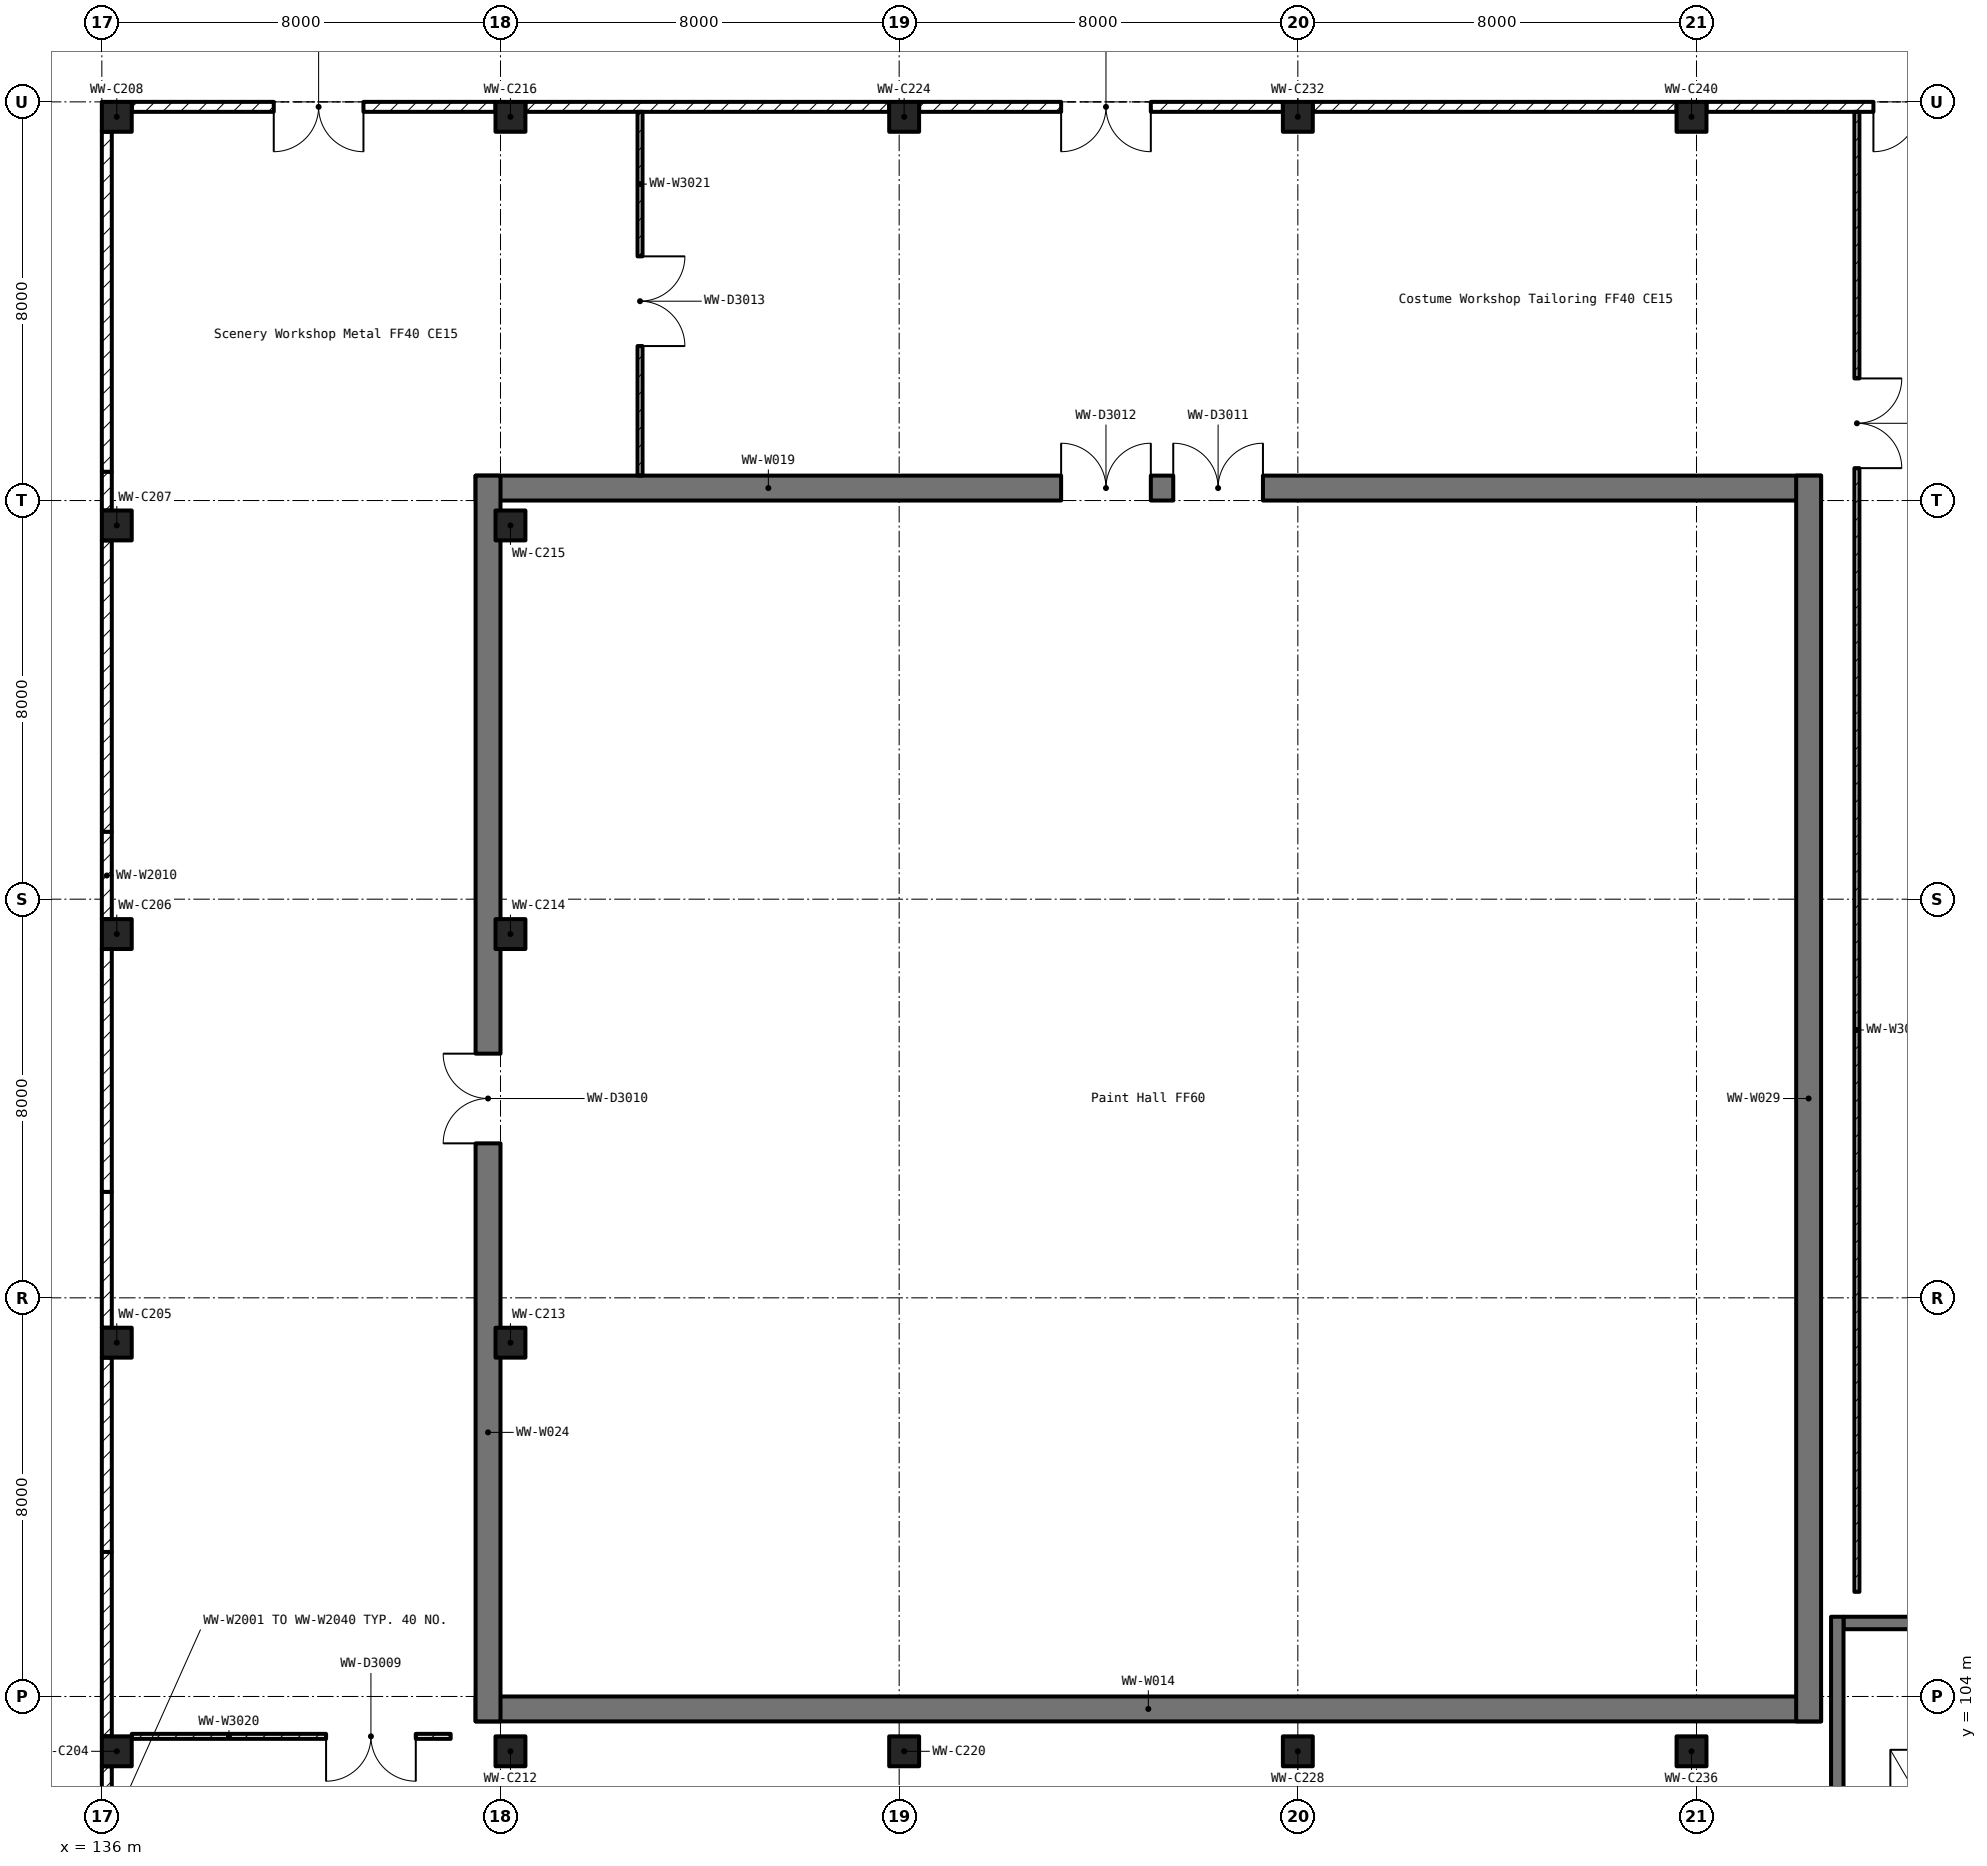
"""IFC4 building model, lengths in metres.
Left out: names, types, materials, properties, quantities, classifications, styles, units other than length and angle.
Written with IfcOpenShell. Run it as: python <this file> out.ifc"""

import sys

from ifc_helpers import new_model, si_unit, direction, frame, frame_2d, origin, origin_2d, place, context, subcontext, project, spatial, rectangle, extrude, element, fill, save


model = new_model("IFC4")
c1 = context("Model", 3, precision=1e-05, world=origin(), true_north=direction((0.0, 1.0)))
c2 = subcontext(c1, "Body", "Model", "MODEL_VIEW")
j1 = project(units=[si_unit("LENGTHUNIT", "METRE"), si_unit("PLANEANGLEUNIT", "RADIAN")], contexts=[c1])
p1 = place(None, origin())
s1 = spatial("IfcSite", under=j1, at=p1, CompositionType="ELEMENT")
p2 = place(p1, origin())
s2 = spatial("IfcBuilding", under=s1, at=p2, CompositionType="ELEMENT")
p3 = place(p2, origin())
s3 = spatial("IfcBuildingStorey", under=s2, at=p3, CompositionType="ELEMENT", Elevation=0.0)
for number, where, z_axis, x_axis in (
    (1, (136.3, 102.9, 0.0), (0.0, 0.0, 1.0), (1.0, 0.0, 0.0)),
    (2, (136.3, 111.1, 0.0), (0.0, 0.0, 1.0), (1.0, 0.0, 0.0)),
    (3, (136.3, 119.3, 0.0), (0.0, 0.0, 1.0), (1.0, 0.0, 0.0)),
    (4, (136.3, 127.5, 0.0), (0.0, 0.0, 1.0), (1.0, 0.0, 0.0)),
    (5, (136.3, 135.7, 0.0), (0.0, 0.0, 1.0), (1.0, 0.0, 0.0)),
    (6, (144.2, 102.9, 0.0), (0.0, 0.0, 1.0), (1.0, 0.0, 0.0)),
    (7, (144.2, 111.1, 0.0), (0.0, 0.0, 1.0), (1.0, 0.0, 0.0)),
    (8, (144.2, 119.3, 0.0), (0.0, 0.0, 1.0), (1.0, 0.0, 0.0)),
    (9, (144.2, 127.5, 0.0), (0.0, 0.0, 1.0), (1.0, 0.0, 0.0)),
    (10, (144.2, 135.7, 0.0), (0.0, 0.0, 1.0), (1.0, 0.0, 0.0)),
    (11, (152.1, 102.9, 0.0), (0.0, 0.0, 1.0), (1.0, 0.0, 0.0)),
    (12, (152.1, 135.7, 0.0), (0.0, 0.0, 1.0), (1.0, 0.0, 0.0)),
    (13, (160.0, 102.9, 0.0), (0.0, 0.0, 1.0), (1.0, 0.0, 0.0)),
    (14, (160.0, 135.7, 0.0), (0.0, 0.0, 1.0), (1.0, 0.0, 0.0)),
    (15, (167.9, 102.9, 0.0), (0.0, 0.0, 1.0), (1.0, 0.0, 0.0)),
    (16, (167.9, 135.7, 0.0), (0.0, 0.0, 1.0), (1.0, 0.0, 0.0)),
):
    element("IfcColumn", number, at=place(p3, frame(where, z_axis=z_axis, x_axis=x_axis)), inside=s3, PredefinedType="COLUMN", context=c2, shape_type="SweptSolid", body=[
        extrude(rectangle(XDim=0.6, YDim=0.6, at=origin_2d()), origin(), (0.0, 0.0, 1.0), 6.0),
    ])
p4 = place(p3, frame((143.5, 103.75, 0.0), z_axis=(0.0, 0.0, 1.0), x_axis=(1.0, 0.0, 0.0)))
e17 = element("IfcWall", 17, at=p4, inside=s3, PredefinedType="SHEAR", context=c2, shape_type="SweptSolid", body=[
    extrude(rectangle(XDim=27.0, YDim=0.5, at=frame_2d((13.5, 0.0))), origin(), (0.0, 0.0, 1.0), 6.0),
])
p5 = place(p3, frame((143.5, 128.25, 0.0), z_axis=(0.0, 0.0, 1.0), x_axis=(1.0, 0.0, 0.0)))
e18 = element("IfcWall", 18, at=p5, inside=s3, PredefinedType="SHEAR", context=c2, shape_type="SweptSolid", body=[
    extrude(rectangle(XDim=27.0, YDim=0.5, at=frame_2d((13.5, 0.0))), origin(), (0.0, 0.0, 1.0), 6.0),
])
p6 = place(p5, frame((14.0, 0.0, 0.0)))
e19 = element("IfcOpeningElement", 19, at=p6, cuts=e18, PredefinedType="OPENING", context=c2, shape_type="SweptSolid", body=[
    extrude(rectangle(XDim=1.8, YDim=2.1, at=frame_2d((0.9, 1.05))), frame((0.0, 0.262, 0.0), z_axis=(0.0, -1.0, 0.0), x_axis=(1.0, 0.0, 0.0)), (0.0, 0.0, 1.0), 0.524),
])
p7 = place(p5, frame((11.75, 0.0, 0.0)))
e20 = element("IfcOpeningElement", 20, at=p7, cuts=e18, PredefinedType="OPENING", context=c2, shape_type="SweptSolid", body=[
    extrude(rectangle(XDim=1.8, YDim=2.1, at=frame_2d((0.9, 1.05))), frame((0.0, 0.262, 0.0), z_axis=(0.0, -1.0, 0.0), x_axis=(1.0, 0.0, 0.0)), (0.0, 0.0, 1.0), 0.524),
])
p8 = place(p3, frame((143.75, 103.5, 0.0), z_axis=(0.0, 0.0, 1.0), x_axis=(0.0, 1.0, 0.0)))
e21 = element("IfcWall", 21, at=p8, inside=s3, PredefinedType="SHEAR", context=c2, shape_type="SweptSolid", body=[
    extrude(rectangle(XDim=25.0, YDim=0.5, at=frame_2d((12.5, 0.0))), origin(), (0.0, 0.0, 1.0), 6.0),
])
p9 = place(p8, frame((11.6, 0.0, 0.0)))
e22 = element("IfcOpeningElement", 22, at=p9, cuts=e21, PredefinedType="OPENING", context=c2, shape_type="SweptSolid", body=[
    extrude(rectangle(XDim=1.8, YDim=2.1, at=frame_2d((0.9, 1.05))), frame((0.0, 0.262, 0.0), z_axis=(0.0, -1.0, 0.0), x_axis=(1.0, 0.0, 0.0)), (0.0, 0.0, 1.0), 0.524),
])
p10 = place(p3, frame((170.25, 103.5, 0.0), z_axis=(0.0, 0.0, 1.0), x_axis=(0.0, 1.0, 0.0)))
e23 = element("IfcWall", 23, at=p10, inside=s3, PredefinedType="SHEAR", context=c2, shape_type="SweptSolid", body=[
    extrude(rectangle(XDim=25.0, YDim=0.5, at=frame_2d((12.5, 0.0))), origin(), (0.0, 0.0, 1.0), 6.0),
])
p11 = place(p3, frame((175.5, 135.9, 0.0), z_axis=(0.0, 0.0, 1.0), x_axis=(-1.0, 0.0, 0.0)))
e24 = element("IfcWall", 24, at=p11, inside=s3, PredefinedType="SOLIDWALL", context=c2, shape_type="SweptSolid", body=[
    extrude(rectangle(XDim=7.3, YDim=0.2, at=frame_2d((3.65, 0.0))), origin(), (0.0, 0.0, 1.0), 5.05),
])
p12 = place(p11, frame((2.15, 0.0, 0.0)))
e25 = element("IfcOpeningElement", 25, at=p12, cuts=e24, PredefinedType="OPENING", context=c2, shape_type="SweptSolid", body=[
    extrude(rectangle(XDim=1.8, YDim=2.4, at=frame_2d((0.9, 1.2))), frame((0.0, 0.112, 0.0), z_axis=(0.0, -1.0, 0.0), x_axis=(1.0, 0.0, 0.0)), (0.0, 0.0, 1.0), 0.224),
])
p13 = place(p3, frame((167.6, 135.9, 0.0), z_axis=(0.0, 0.0, 1.0), x_axis=(-1.0, 0.0, 0.0)))
e26 = element("IfcWall", 26, at=p13, inside=s3, PredefinedType="SOLIDWALL", context=c2, shape_type="SweptSolid", body=[
    extrude(rectangle(XDim=7.3, YDim=0.2, at=frame_2d((3.65, 0.0))), origin(), (0.0, 0.0, 1.0), 5.05),
])
p14 = place(p3, frame((159.7, 135.9, 0.0), z_axis=(0.0, 0.0, 1.0), x_axis=(-1.0, 0.0, 0.0)))
e27 = element("IfcWall", 27, at=p14, inside=s3, PredefinedType="SOLIDWALL", context=c2, shape_type="SweptSolid", body=[
    extrude(rectangle(XDim=7.3, YDim=0.2, at=frame_2d((3.65, 0.0))), origin(), (0.0, 0.0, 1.0), 5.05),
])
p15 = place(p14, frame((2.65, 0.0, 0.0)))
e28 = element("IfcOpeningElement", 28, at=p15, cuts=e27, PredefinedType="OPENING", context=c2, shape_type="SweptSolid", body=[
    extrude(rectangle(XDim=1.8, YDim=2.4, at=frame_2d((0.9, 1.2))), frame((0.0, 0.112, 0.0), z_axis=(0.0, -1.0, 0.0), x_axis=(1.0, 0.0, 0.0)), (0.0, 0.0, 1.0), 0.224),
])
p16 = place(p3, frame((151.8, 135.9, 0.0), z_axis=(0.0, 0.0, 1.0), x_axis=(-1.0, 0.0, 0.0)))
e29 = element("IfcWall", 29, at=p16, inside=s3, PredefinedType="SOLIDWALL", context=c2, shape_type="SweptSolid", body=[
    extrude(rectangle(XDim=7.3, YDim=0.2, at=frame_2d((3.65, 0.0))), origin(), (0.0, 0.0, 1.0), 5.05),
])
p17 = place(p3, frame((143.9, 135.9, 0.0), z_axis=(0.0, 0.0, 1.0), x_axis=(-1.0, 0.0, 0.0)))
e30 = element("IfcWall", 30, at=p17, inside=s3, PredefinedType="SOLIDWALL", context=c2, shape_type="SweptSolid", body=[
    extrude(rectangle(XDim=7.3, YDim=0.2, at=frame_2d((3.65, 0.0))), origin(), (0.0, 0.0, 1.0), 5.05),
])
p18 = place(p17, frame((2.65, 0.0, 0.0)))
e31 = element("IfcOpeningElement", 31, at=p18, cuts=e30, PredefinedType="OPENING", context=c2, shape_type="SweptSolid", body=[
    extrude(rectangle(XDim=1.8, YDim=2.4, at=frame_2d((0.9, 1.2))), frame((0.0, 0.112, 0.0), z_axis=(0.0, -1.0, 0.0), x_axis=(1.0, 0.0, 0.0)), (0.0, 0.0, 1.0), 0.224),
])
p19 = place(p3, frame((136.1, 135.4, 0.0), z_axis=(0.0, 0.0, 1.0), x_axis=(0.0, -1.0, 0.0)))
e32 = element("IfcWall", 32, at=p19, inside=s3, PredefinedType="SOLIDWALL", context=c2, shape_type="SweptSolid", body=[
    extrude(rectangle(XDim=6.825, YDim=0.2, at=frame_2d((3.413, 0.0))), origin(), (0.0, 0.0, 1.0), 5.05),
])
p20 = place(p3, frame((136.1, 128.575, 0.0), z_axis=(0.0, 0.0, 1.0), x_axis=(0.0, -1.0, 0.0)))
e33 = element("IfcWall", 33, at=p20, inside=s3, PredefinedType="SOLIDWALL", context=c2, shape_type="SweptSolid", body=[
    extrude(rectangle(XDim=0.775, YDim=0.2, at=frame_2d((0.387, 0.0))), origin(), (0.0, 0.0, 1.0), 5.05),
])
p21 = place(p3, frame((136.1, 127.2, 0.0), z_axis=(0.0, 0.0, 1.0), x_axis=(0.0, -1.0, 0.0)))
e34 = element("IfcWall", 34, at=p21, inside=s3, PredefinedType="SOLIDWALL", context=c2, shape_type="SweptSolid", body=[
    extrude(rectangle(XDim=5.85, YDim=0.2, at=frame_2d((2.925, 0.0))), origin(), (0.0, 0.0, 1.0), 5.05),
])
p22 = place(p3, frame((136.1, 121.35, 0.0), z_axis=(0.0, 0.0, 1.0), x_axis=(0.0, -1.0, 0.0)))
e35 = element("IfcWall", 35, at=p22, inside=s3, PredefinedType="SOLIDWALL", context=c2, shape_type="SweptSolid", body=[
    extrude(rectangle(XDim=1.75, YDim=0.2, at=frame_2d((0.875, 0.0))), origin(), (0.0, 0.0, 1.0), 5.05),
])
p23 = place(p3, frame((136.1, 119.0, 0.0), z_axis=(0.0, 0.0, 1.0), x_axis=(0.0, -1.0, 0.0)))
e36 = element("IfcWall", 36, at=p23, inside=s3, PredefinedType="SOLIDWALL", context=c2, shape_type="SweptSolid", body=[
    extrude(rectangle(XDim=4.875, YDim=0.2, at=frame_2d((2.438, 0.0))), origin(), (0.0, 0.0, 1.0), 5.05),
])
p24 = place(p3, frame((136.1, 114.125, 0.0), z_axis=(0.0, 0.0, 1.0), x_axis=(0.0, -1.0, 0.0)))
e37 = element("IfcWall", 37, at=p24, inside=s3, PredefinedType="SOLIDWALL", context=c2, shape_type="SweptSolid", body=[
    extrude(rectangle(XDim=2.725, YDim=0.2, at=frame_2d((1.363, 0.0))), origin(), (0.0, 0.0, 1.0), 5.05),
])
p25 = place(p3, frame((136.1, 110.8, 0.0), z_axis=(0.0, 0.0, 1.0), x_axis=(0.0, -1.0, 0.0)))
e38 = element("IfcWall", 38, at=p25, inside=s3, PredefinedType="SOLIDWALL", context=c2, shape_type="SweptSolid", body=[
    extrude(rectangle(XDim=3.9, YDim=0.2, at=frame_2d((1.95, 0.0))), origin(), (0.0, 0.0, 1.0), 5.05),
])
p26 = place(p3, frame((136.1, 106.9, 0.0), z_axis=(0.0, 0.0, 1.0), x_axis=(0.0, -1.0, 0.0)))
e39 = element("IfcWall", 39, at=p26, inside=s3, PredefinedType="SOLIDWALL", context=c2, shape_type="SweptSolid", body=[
    extrude(rectangle(XDim=3.7, YDim=0.2, at=frame_2d((1.85, 0.0))), origin(), (0.0, 0.0, 1.0), 5.05),
])
p27 = place(p3, frame((136.1, 102.6, 0.0), z_axis=(0.0, 0.0, 1.0), x_axis=(0.0, -1.0, 0.0)))
e40 = element("IfcWall", 40, at=p27, inside=s3, PredefinedType="SOLIDWALL", context=c2, shape_type="SweptSolid", body=[
    extrude(rectangle(XDim=2.925, YDim=0.2, at=frame_2d((1.462, 0.0))), origin(), (0.0, 0.0, 1.0), 5.05),
])
p28 = place(p3, frame((174.05, 105.475, 0.0), z_axis=(0.0, 0.0, 1.0), x_axis=(-1.0, 0.0, 0.0)))
e41 = element("IfcWall", 41, at=p28, inside=s3, PredefinedType="SOLIDWALL", context=c2, shape_type="SweptSolid", body=[
    extrude(rectangle(XDim=3.1, YDim=0.25, at=frame_2d((1.55, 0.0))), origin(), (0.0, 0.0, 1.0), 6.0),
])
p29 = place(p3, frame((170.825, 105.6, 0.0), z_axis=(0.0, 0.0, 1.0), x_axis=(0.0, -1.0, 0.0)))
e42 = element("IfcWall", 42, at=p29, inside=s3, PredefinedType="SOLIDWALL", context=c2, shape_type="SweptSolid", body=[
    extrude(rectangle(XDim=6.6, YDim=0.25, at=frame_2d((3.3, 0.0))), origin(), (0.0, 0.0, 1.0), 6.0),
])
p30 = place(p3, frame((171.219, 135.8, 0.0), z_axis=(0.0, 0.0, 1.0), x_axis=(0.0, -1.0, 0.0)))
e43 = element("IfcWall", 43, at=p30, inside=s3, PredefinedType="PARTITIONING", context=c2, shape_type="SweptSolid", body=[
    extrude(rectangle(XDim=29.7, YDim=0.1, at=frame_2d((14.85, 0.0))), origin(), (0.0, 0.0, 1.0), 4.95),
])
p31 = place(p30, frame((5.35, 0.0, 0.0)))
e44 = element("IfcOpeningElement", 44, at=p31, cuts=e43, PredefinedType="OPENING", context=c2, shape_type="SweptSolid", body=[
    extrude(rectangle(XDim=1.8, YDim=2.1, at=frame_2d((0.9, 1.05))), frame((0.0, 0.062, 0.0), z_axis=(0.0, -1.0, 0.0), x_axis=(1.0, 0.0, 0.0)), (0.0, 0.0, 1.0), 0.124),
])
p32 = place(p3, frame((143.0, 103.2, 0.0), z_axis=(0.0, 0.0, 1.0), x_axis=(-1.0, 0.0, 0.0)))
e45 = element("IfcWall", 45, at=p32, inside=s3, PredefinedType="PARTITIONING", context=c2, shape_type="SweptSolid", body=[
    extrude(rectangle(XDim=6.399, YDim=0.1, at=frame_2d((3.199, 0.0))), origin(), (0.0, 0.0, 1.0), 4.95),
])
p33 = place(p32, frame((0.7, 0.0, 0.0)))
e46 = element("IfcOpeningElement", 46, at=p33, cuts=e45, PredefinedType="OPENING", context=c2, shape_type="SweptSolid", body=[
    extrude(rectangle(XDim=1.8, YDim=2.1, at=frame_2d((0.9, 1.05))), frame((0.0, 0.062, 0.0), z_axis=(0.0, -1.0, 0.0), x_axis=(1.0, 0.0, 0.0)), (0.0, 0.0, 1.0), 0.124),
])
p34 = place(p3, frame((146.8, 135.8, 0.0), z_axis=(0.0, 0.0, 1.0), x_axis=(0.0, -1.0, 0.0)))
e47 = element("IfcWall", 47, at=p34, inside=s3, PredefinedType="PARTITIONING", context=c2, shape_type="SweptSolid", body=[
    extrude(rectangle(XDim=7.3, YDim=0.1, at=frame_2d((3.65, 0.0))), origin(), (0.0, 0.0, 1.0), 4.95),
])
p35 = place(p34, frame((2.9, 0.0, 0.0)))
e48 = element("IfcOpeningElement", 48, at=p35, cuts=e47, PredefinedType="OPENING", context=c2, shape_type="SweptSolid", body=[
    extrude(rectangle(XDim=1.8, YDim=2.1, at=frame_2d((0.9, 1.05))), frame((0.0, 0.062, 0.0), z_axis=(0.0, -1.0, 0.0), x_axis=(1.0, 0.0, 0.0)), (0.0, 0.0, 1.0), 0.124),
])
p36 = place(p33, origin())
e49 = element("IfcDoor", 49, at=p36, inside=s3, OperationType="DOUBLE_DOOR_SINGLE_SWING", PredefinedType="DOOR", context=c2, shape_type="SweptSolid", body=[
    extrude(rectangle(XDim=1.8, YDim=2.1, at=frame_2d((0.9, 1.05))), frame((0.0, 0.025, 0.0), z_axis=(0.0, -1.0, 0.0), x_axis=(1.0, 0.0, 0.0)), (0.0, 0.0, 1.0), 0.05),
])
fill(e46, e49)
p37 = place(p9, origin())
e50 = element("IfcDoor", 50, at=p37, inside=s3, OperationType="DOUBLE_DOOR_SINGLE_SWING", PredefinedType="DOOR", context=c2, shape_type="SweptSolid", body=[
    extrude(rectangle(XDim=1.8, YDim=2.1, at=frame_2d((0.9, 1.05))), frame((0.0, 0.025, 0.0), z_axis=(0.0, -1.0, 0.0), x_axis=(1.0, 0.0, 0.0)), (0.0, 0.0, 1.0), 0.05),
])
fill(e22, e50)
p38 = place(p6, origin())
e51 = element("IfcDoor", 51, at=p38, inside=s3, OperationType="DOUBLE_DOOR_SINGLE_SWING", PredefinedType="DOOR", context=c2, shape_type="SweptSolid", body=[
    extrude(rectangle(XDim=1.8, YDim=2.1, at=frame_2d((0.9, 1.05))), frame((0.0, 0.025, 0.0), z_axis=(0.0, -1.0, 0.0), x_axis=(1.0, 0.0, 0.0)), (0.0, 0.0, 1.0), 0.05),
])
fill(e19, e51)
p39 = place(p7, origin())
e52 = element("IfcDoor", 52, at=p39, inside=s3, OperationType="DOUBLE_DOOR_SINGLE_SWING", PredefinedType="DOOR", context=c2, shape_type="SweptSolid", body=[
    extrude(rectangle(XDim=1.8, YDim=2.1, at=frame_2d((0.9, 1.05))), frame((0.0, 0.025, 0.0), z_axis=(0.0, -1.0, 0.0), x_axis=(1.0, 0.0, 0.0)), (0.0, 0.0, 1.0), 0.05),
])
fill(e20, e52)
p40 = place(p35, origin())
e53 = element("IfcDoor", 53, at=p40, inside=s3, OperationType="DOUBLE_DOOR_SINGLE_SWING", PredefinedType="DOOR", context=c2, shape_type="SweptSolid", body=[
    extrude(rectangle(XDim=1.8, YDim=2.1, at=frame_2d((0.9, 1.05))), frame((0.0, 0.025, 0.0), z_axis=(0.0, -1.0, 0.0), x_axis=(1.0, 0.0, 0.0)), (0.0, 0.0, 1.0), 0.05),
])
fill(e48, e53)
p41 = place(p31, origin())
e54 = element("IfcDoor", 54, at=p41, inside=s3, OperationType="DOUBLE_DOOR_SINGLE_SWING", PredefinedType="DOOR", context=c2, shape_type="SweptSolid", body=[
    extrude(rectangle(XDim=1.8, YDim=2.1, at=frame_2d((0.9, 1.05))), frame((0.0, 0.025, 0.0), z_axis=(0.0, -1.0, 0.0), x_axis=(1.0, 0.0, 0.0)), (0.0, 0.0, 1.0), 0.05),
])
fill(e44, e54)
p42 = place(p12, origin())
e55 = element("IfcDoor", 55, at=p42, inside=s3, OperationType="DOUBLE_DOOR_DOUBLE_SWING", PredefinedType="DOOR", context=c2, shape_type="SweptSolid", body=[
    extrude(rectangle(XDim=1.8, YDim=2.4, at=frame_2d((0.9, 1.2))), frame((0.0, 0.025, 0.0), z_axis=(0.0, -1.0, 0.0), x_axis=(1.0, 0.0, 0.0)), (0.0, 0.0, 1.0), 0.05),
])
fill(e25, e55)
p43 = place(p15, origin())
e56 = element("IfcDoor", 56, at=p43, inside=s3, OperationType="DOUBLE_DOOR_DOUBLE_SWING", PredefinedType="DOOR", context=c2, shape_type="SweptSolid", body=[
    extrude(rectangle(XDim=1.8, YDim=2.4, at=frame_2d((0.9, 1.2))), frame((0.0, 0.025, 0.0), z_axis=(0.0, -1.0, 0.0), x_axis=(1.0, 0.0, 0.0)), (0.0, 0.0, 1.0), 0.05),
])
fill(e28, e56)
p44 = place(p18, origin())
e57 = element("IfcDoor", 57, at=p44, inside=s3, OperationType="DOUBLE_DOOR_DOUBLE_SWING", PredefinedType="DOOR", context=c2, shape_type="SweptSolid", body=[
    extrude(rectangle(XDim=1.8, YDim=2.4, at=frame_2d((0.9, 1.2))), frame((0.0, 0.025, 0.0), z_axis=(0.0, -1.0, 0.0), x_axis=(1.0, 0.0, 0.0)), (0.0, 0.0, 1.0), 0.05),
])
fill(e31, e57)
save(model, sys.argv[1])
